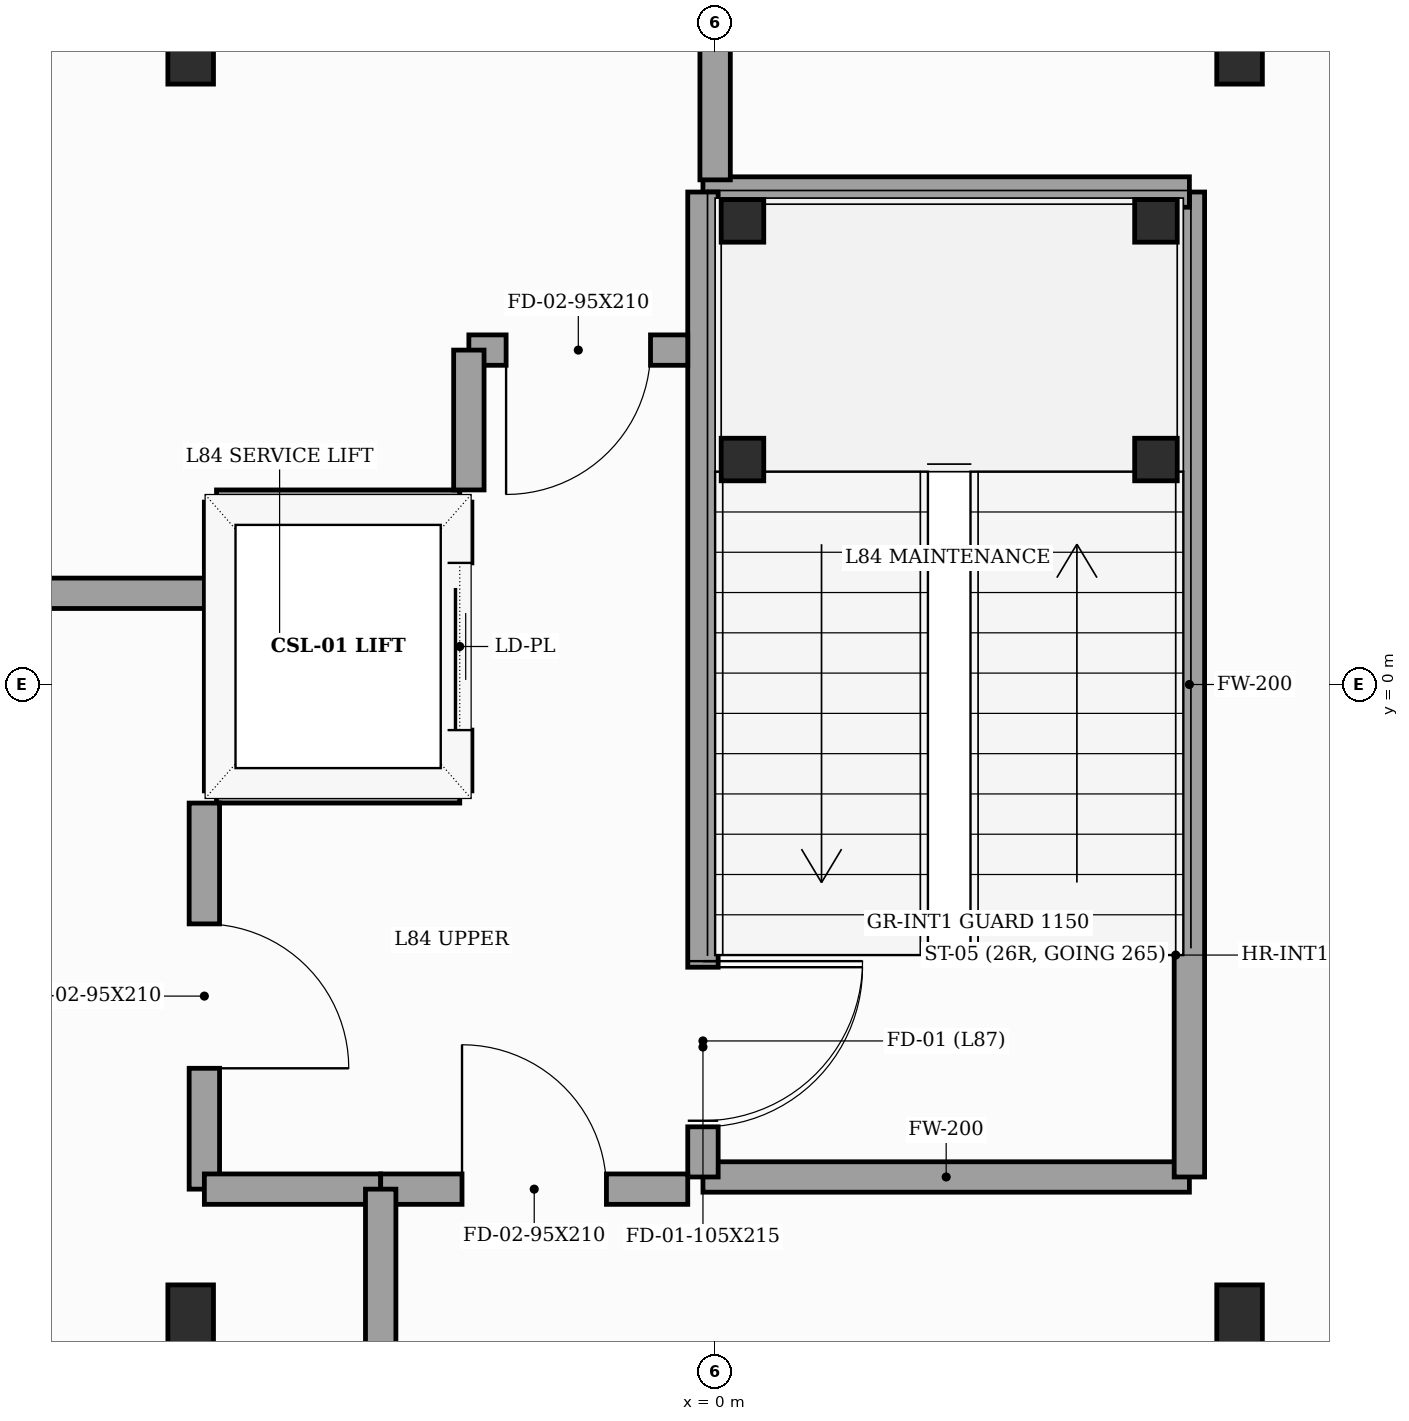
"""IFC4 building model, lengths in metres.
Left out: names, types, materials, properties, quantities, classifications, styles, units other than length and angle.
Written with IfcOpenShell. Run it as: python <this file> out.ifc"""

import sys

from ifc_helpers import new_model, si_unit, direction, frame, frame_2d, origin, origin_2d, place, context, subcontext, project, spatial, rectangle, i_section, extrude, element, fill, save


model = new_model("IFC4")
c1 = context("Model", 3, precision=1e-05, world=origin(), true_north=direction((0.0, 1.0)))
c2 = subcontext(c1, "Body", "Model", "MODEL_VIEW")
j1 = project(units=[si_unit("LENGTHUNIT", "METRE"), si_unit("PLANEANGLEUNIT", "RADIAN")], contexts=[c1])
p1 = place(None, origin())
s1 = spatial("IfcSite", under=j1, at=p1, CompositionType="ELEMENT")
p2 = place(p1, origin())
s2 = spatial("IfcBuilding", under=s1, at=p2, CompositionType="ELEMENT")
p3 = place(p2, frame((0.0, 0.0, 326.6)))
s3 = spatial("IfcBuildingStorey", under=s2, at=p3, CompositionType="ELEMENT", Elevation=326.6)
for number, where, z_axis, x_axis in (
    (1, (-3.45, -4.25, 0.0), (0.0, 0.0, 1.0), (1.0, 0.0, 0.0)),
    (2, (3.45, -4.25, 0.0), (0.0, 0.0, 1.0), (1.0, 0.0, 0.0)),
    (3, (3.45, 4.25, 0.0), (0.0, 0.0, 1.0), (1.0, 0.0, 0.0)),
    (4, (-3.45, 4.25, 0.0), (0.0, 0.0, 1.0), (1.0, 0.0, 0.0)),
):
    element("IfcColumn", number, at=place(p3, frame(where, z_axis=z_axis, x_axis=x_axis)), inside=s3, PredefinedType="COLUMN", context=c2, shape_type="SweptSolid", body=[
        extrude(i_section(OverallWidth=0.3, OverallDepth=0.6, WebThickness=0.015, FlangeThickness=0.03, at=origin_2d()), origin(), (0.0, 0.0, 1.0), 4.2),
    ])
for number, where, z_axis, x_axis in (
    (5, (0.18, 1.48, 0.0), (0.0, 0.0, 1.0), (1.0, 0.0, 0.0)),
    (6, (2.9, 1.48, 0.0), (0.0, 0.0, 1.0), (1.0, 0.0, 0.0)),
    (7, (0.18, 3.05, 0.0), (0.0, 0.0, 1.0), (1.0, 0.0, 0.0)),
    (8, (2.9, 3.05, 0.0), (0.0, 0.0, 1.0), (1.0, 0.0, 0.0)),
):
    element("IfcColumn", number, at=place(p3, frame(where, z_axis=z_axis, x_axis=x_axis)), inside=s3, PredefinedType="PILASTER", context=c2, shape_type="SweptSolid", body=[
        extrude(i_section(OverallWidth=0.28, OverallDepth=0.28, WebThickness=0.01, FlangeThickness=0.018, at=origin_2d()), origin(), (0.0, 0.0, 1.0), 4.2),
    ])
p4 = place(p3, frame((-0.08, -3.24, 0.0), z_axis=(0.0, 0.0, 1.0), x_axis=(1.0, 0.0, 0.0)))
e9 = element("IfcWall", 9, at=p4, inside=s3, PredefinedType="SOLIDWALL", context=c2, shape_type="SweptSolid", body=[
    extrude(rectangle(XDim=3.2, YDim=0.2, at=frame_2d((1.6, 0.0))), origin(), (0.0, 0.0, 1.0), 3.98),
])
p5 = place(p3, frame((3.12, -3.24, 0.0), z_axis=(0.0, 0.0, 1.0), x_axis=(0.0, 1.0, 0.0)))
e10 = element("IfcWall", 10, at=p5, inside=s3, PredefinedType="SOLIDWALL", context=c2, shape_type="SweptSolid", body=[
    extrude(rectangle(XDim=6.48, YDim=0.2, at=frame_2d((3.24, 0.0))), origin(), (0.0, 0.0, 1.0), 2.565),
])
p6 = place(p3, frame((3.12, 3.24, 0.0), z_axis=(0.0, 0.0, 1.0), x_axis=(-1.0, 0.0, 0.0)))
e11 = element("IfcWall", 11, at=p6, inside=s3, PredefinedType="SOLIDWALL", context=c2, shape_type="SweptSolid", body=[
    extrude(rectangle(XDim=3.2, YDim=0.2, at=frame_2d((1.6, 0.0))), origin(), (0.0, 0.0, 1.0), 3.98),
])
p7 = place(p3, frame((-0.08, 3.24, 0.0), z_axis=(0.0, 0.0, 1.0), x_axis=(0.0, -1.0, 0.0)))
e12 = element("IfcWall", 12, at=p7, inside=s3, PredefinedType="SOLIDWALL", context=c2, shape_type="SweptSolid", body=[
    extrude(rectangle(XDim=6.48, YDim=0.2, at=frame_2d((3.24, 0.0))), origin(), (0.0, 0.0, 1.0), 3.98),
])
p8 = place(p7, frame((5.1, 0.0, 0.0)))
e13 = element("IfcOpeningElement", 13, at=p8, cuts=e12, PredefinedType="OPENING", context=c2, shape_type="SweptSolid", body=[
    extrude(rectangle(XDim=1.05, YDim=2.15, at=frame_2d((0.525, 1.075))), frame((0.0, 0.11, 0.0), z_axis=(0.0, -1.0, 0.0), x_axis=(1.0, 0.0, 0.0)), (0.0, 0.0, 1.0), 0.22),
])
p9 = place(p3, frame((-3.28, -0.7, 0.0), z_axis=(0.0, 0.0, 1.0), x_axis=(0.0, 1.0, 0.0)))
e14 = element("IfcWall", 14, at=p9, inside=s3, PredefinedType="SOLIDWALL", context=c2, shape_type="SweptSolid", body=[
    extrude(rectangle(XDim=1.9, YDim=0.16, at=frame_2d((0.95, 0.0))), origin(), (0.0, 0.0, 1.0), 2.565),
])
for number, where, z_axis, x_axis in (
    (15, (-3.28, 1.2, 0.0), (0.0, 0.0, 1.0), (1.0, 0.0, 0.0)),
    (16, (-1.68, -0.7, 0.0), (0.0, 0.0, 1.0), (-1.0, 0.0, 0.0)),
):
    element("IfcWall", number, at=place(p3, frame(where, z_axis=z_axis, x_axis=x_axis)), inside=s3, PredefinedType="SOLIDWALL", context=c2, shape_type="SweptSolid", body=[
        extrude(rectangle(XDim=1.6, YDim=0.16, at=frame_2d((0.8, 0.0))), origin(), (0.0, 0.0, 1.0), 2.565),
    ])
p10 = place(p3, frame((-1.68, -0.7, 0.0), z_axis=(0.0, 0.0, 1.0), x_axis=(0.0, 1.0, 0.0)))
e17 = element("IfcWall", 17, at=p10, inside=s3, PredefinedType="SOLIDWALL", context=c2, shape_type="SweptSolid", body=[
    extrude(rectangle(XDim=1.9, YDim=0.16, at=frame_2d((0.95, 0.0))), origin(), (0.0, 0.0, 1.0), 3.98),
])
p11 = place(p10, frame((0.4, 0.0, 0.0)))
e18 = element("IfcOpeningElement", 18, at=p11, cuts=e17, PredefinedType="OPENING", context=c2, shape_type="SweptSolid", body=[
    extrude(rectangle(XDim=1.1, YDim=2.1, at=frame_2d((0.55, 1.05))), frame((0.0, 0.09, 0.0), z_axis=(0.0, -1.0, 0.0), x_axis=(1.0, 0.0, 0.0)), (0.0, 0.0, 1.0), 0.18),
])
p12 = place(p3, frame((-3.36, -0.78, 0.0), z_axis=(0.0, 0.0, 1.0), x_axis=(0.0, -1.0, 0.0)))
e19 = element("IfcWall", 19, at=p12, inside=s3, PredefinedType="SOLIDWALL", context=c2, shape_type="SweptSolid", body=[
    extrude(rectangle(XDim=2.54, YDim=0.2, at=frame_2d((1.27, 0.0))), origin(), (0.0, 0.0, 1.0), 2.565),
])
p13 = place(p12, frame((0.795, 0.0, 0.0)))
e20 = element("IfcOpeningElement", 20, at=p13, cuts=e19, PredefinedType="OPENING", context=c2, shape_type="SweptSolid", body=[
    extrude(rectangle(XDim=0.95, YDim=2.1, at=frame_2d((0.475, 1.05))), frame((0.0, 0.11, 0.0), z_axis=(0.0, -1.0, 0.0), x_axis=(1.0, 0.0, 0.0)), (0.0, 0.0, 1.0), 0.22),
])
p14 = place(p3, frame((-3.36, -3.32, 0.0), z_axis=(0.0, 0.0, 1.0), x_axis=(1.0, 0.0, 0.0)))
e21 = element("IfcWall", 21, at=p14, inside=s3, PredefinedType="SOLIDWALL", context=c2, shape_type="SweptSolid", body=[
    extrude(rectangle(XDim=1.16, YDim=0.2, at=frame_2d((0.58, 0.0))), origin(), (0.0, 0.0, 1.0), 2.565),
])
p15 = place(p3, frame((-2.2, -3.32, 0.0), z_axis=(0.0, 0.0, 1.0), x_axis=(1.0, 0.0, 0.0)))
e22 = element("IfcWall", 22, at=p15, inside=s3, PredefinedType="SOLIDWALL", context=c2, shape_type="SweptSolid", body=[
    extrude(rectangle(XDim=2.02, YDim=0.2, at=frame_2d((1.01, 0.0))), origin(), (0.0, 0.0, 1.0), 3.98),
])
p16 = place(p15, frame((0.535, 0.0, 0.0)))
e23 = element("IfcOpeningElement", 23, at=p16, cuts=e22, PredefinedType="OPENING", context=c2, shape_type="SweptSolid", body=[
    extrude(rectangle(XDim=0.95, YDim=2.1, at=frame_2d((0.475, 1.05))), frame((0.0, 0.11, 0.0), z_axis=(0.0, -1.0, 0.0), x_axis=(1.0, 0.0, 0.0)), (0.0, 0.0, 1.0), 0.22),
])
p17 = place(p3, frame((-0.18, 2.2, 0.0), z_axis=(0.0, 0.0, 1.0), x_axis=(-1.0, 0.0, 0.0)))
e24 = element("IfcWall", 24, at=p17, inside=s3, PredefinedType="SOLIDWALL", context=c2, shape_type="SweptSolid", body=[
    extrude(rectangle(XDim=1.44, YDim=0.2, at=frame_2d((0.72, 0.0))), origin(), (0.0, 0.0, 1.0), 3.98),
])
p18 = place(p17, frame((0.245, 0.0, 0.0)))
e25 = element("IfcOpeningElement", 25, at=p18, cuts=e24, PredefinedType="OPENING", context=c2, shape_type="SweptSolid", body=[
    extrude(rectangle(XDim=0.95, YDim=2.1, at=frame_2d((0.475, 1.05))), frame((0.0, 0.11, 0.0), z_axis=(0.0, -1.0, 0.0), x_axis=(1.0, 0.0, 0.0)), (0.0, 0.0, 1.0), 0.22),
])
p19 = place(p3, frame((-1.62, 2.2, 0.0), z_axis=(0.0, 0.0, 1.0), x_axis=(0.0, -1.0, 0.0)))
e26 = element("IfcWall", 26, at=p19, inside=s3, PredefinedType="SOLIDWALL", context=c2, shape_type="SweptSolid", body=[
    extrude(rectangle(XDim=0.92, YDim=0.2, at=frame_2d((0.46, 0.0))), origin(), (0.0, 0.0, 1.0), 3.98),
])
p20 = place(p3, frame((-2.2, -12.816, 0.0), z_axis=(0.0, 0.0, 1.0), x_axis=(0.0, 1.0, 0.0)))
e27 = element("IfcWall", 27, at=p20, inside=s3, PredefinedType="SOLIDWALL", context=c2, shape_type="SweptSolid", body=[
    extrude(rectangle(XDim=9.496, YDim=0.2, at=frame_2d((4.748, 0.0))), origin(), (0.0, 0.0, 1.0), 2.565),
])
p21 = place(p3, frame((-3.36, 0.6, 0.0), z_axis=(0.0, 0.0, 1.0), x_axis=(-1.0, 0.0, 0.0)))
e28 = element("IfcWall", 28, at=p21, inside=s3, PredefinedType="SOLIDWALL", context=c2, shape_type="SweptSolid", body=[
    extrude(rectangle(XDim=10.92, YDim=0.2, at=frame_2d((5.46, 0.0))), origin(), (0.0, 0.0, 1.0), 2.565),
])
p22 = place(p3, frame((0.0, 10.439, 0.0), z_axis=(0.0, 0.0, 1.0), x_axis=(0.0, -1.0, 0.0)))
e29 = element("IfcWall", 29, at=p22, inside=s3, PredefinedType="SOLIDWALL", context=c2, shape_type="SweptSolid", body=[
    extrude(rectangle(XDim=7.119, YDim=0.2, at=frame_2d((3.559, 0.0))), origin(), (0.0, 0.0, 1.0), 2.565),
])
p23 = place(p8, origin())
e30 = element("IfcDoor", 30, at=p23, inside=s3, OperationType="SINGLE_SWING_LEFT", PredefinedType="DOOR", context=c2, shape_type="SweptSolid", body=[
    extrude(rectangle(XDim=1.05, YDim=2.15, at=frame_2d((0.525, 1.075))), frame((0.0, 0.025, 0.0), z_axis=(0.0, -1.0, 0.0), x_axis=(1.0, 0.0, 0.0)), (0.0, 0.0, 1.0), 0.05),
])
fill(e13, e30)
p24 = place(p11, origin())
e31 = element("IfcDoor", 31, at=p24, inside=s3, OperationType="SLIDING_TO_LEFT", PredefinedType="DOOR", context=c2, shape_type="SweptSolid", body=[
    extrude(rectangle(XDim=1.1, YDim=2.1, at=frame_2d((0.55, 1.05))), frame((0.0, 0.025, 0.0), z_axis=(0.0, -1.0, 0.0), x_axis=(1.0, 0.0, 0.0)), (0.0, 0.0, 1.0), 0.05),
])
fill(e18, e31)
p25 = place(p13, origin())
e32 = element("IfcDoor", 32, at=p25, inside=s3, OperationType="SINGLE_SWING_RIGHT", PredefinedType="DOOR", context=c2, shape_type="SweptSolid", body=[
    extrude(rectangle(XDim=0.95, YDim=2.1, at=frame_2d((0.475, 1.05))), frame((0.0, 0.025, 0.0), z_axis=(0.0, -1.0, 0.0), x_axis=(1.0, 0.0, 0.0)), (0.0, 0.0, 1.0), 0.05),
])
fill(e20, e32)
p26 = place(p16, origin())
e33 = element("IfcDoor", 33, at=p26, inside=s3, OperationType="SINGLE_SWING_LEFT", PredefinedType="DOOR", context=c2, shape_type="SweptSolid", body=[
    extrude(rectangle(XDim=0.95, YDim=2.1, at=frame_2d((0.475, 1.05))), frame((0.0, 0.025, 0.0), z_axis=(0.0, -1.0, 0.0), x_axis=(1.0, 0.0, 0.0)), (0.0, 0.0, 1.0), 0.05),
])
fill(e23, e33)
p27 = place(p18, origin())
e34 = element("IfcDoor", 34, at=p27, inside=s3, OperationType="SINGLE_SWING_RIGHT", PredefinedType="DOOR", context=c2, shape_type="SweptSolid", body=[
    extrude(rectangle(XDim=0.95, YDim=2.1, at=frame_2d((0.475, 1.05))), frame((0.0, 0.025, 0.0), z_axis=(0.0, -1.0, 0.0), x_axis=(1.0, 0.0, 0.0)), (0.0, 0.0, 1.0), 0.05),
])
fill(e25, e34)
save(model, sys.argv[1])
